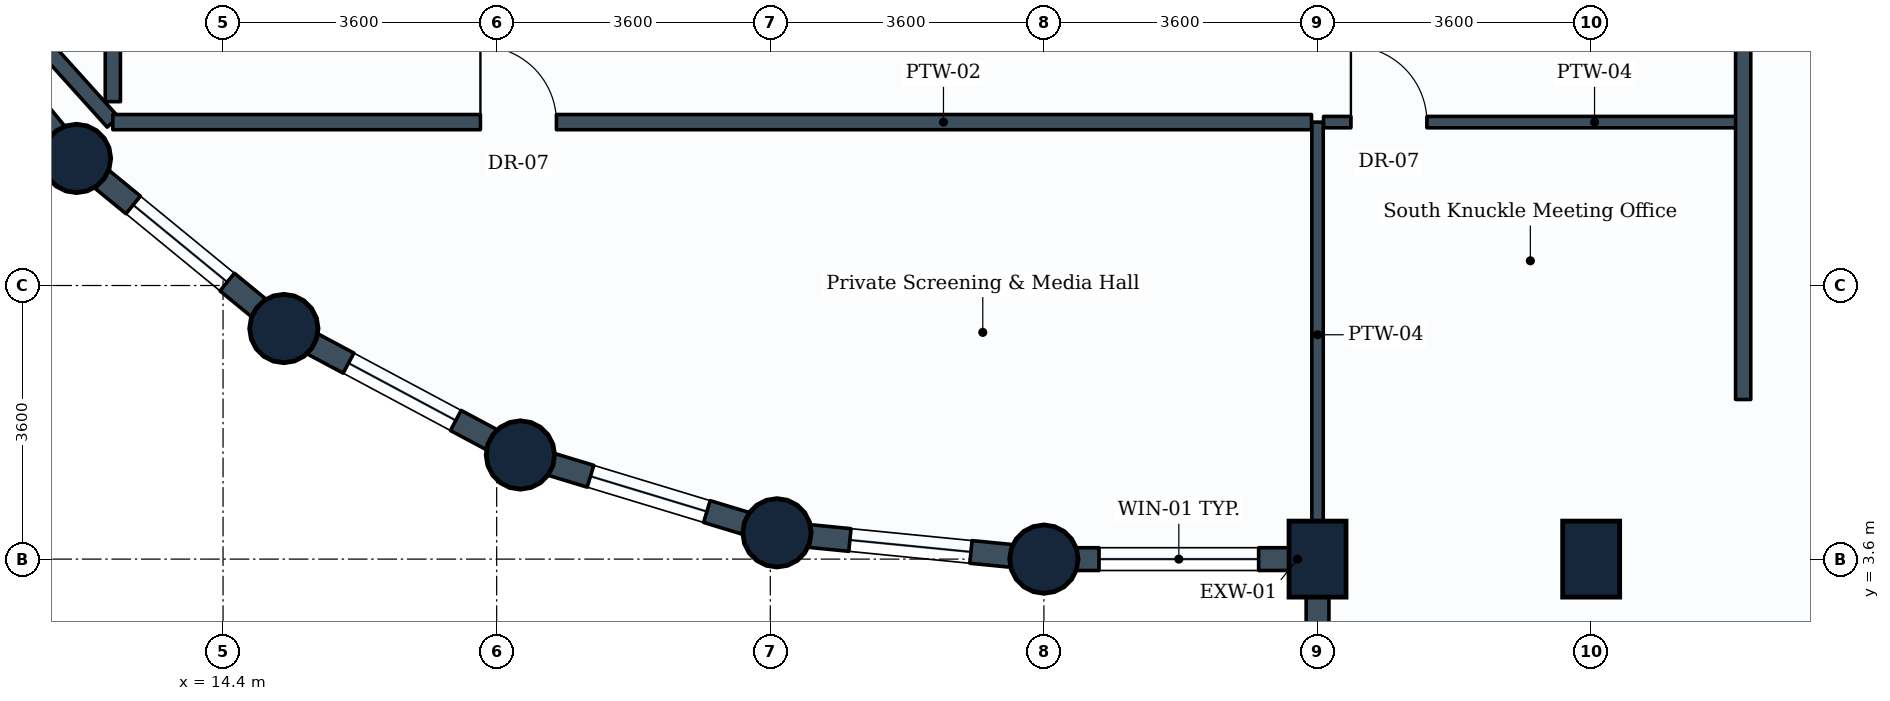
"""IFC4 building model, lengths in metres.
Left out: names, types, materials, properties, quantities, classifications, styles, units other than length and angle.
Written with IfcOpenShell. Run it as: python <this file> out.ifc"""

import sys

from ifc_helpers import new_model, si_unit, direction, frame, frame_2d, origin, origin_2d, place, context, subcontext, project, spatial, rectangle, circle, extrude, element, fill, save


model = new_model("IFC4")
c1 = context("Model", 3, precision=1e-05, world=origin(), true_north=direction((0.0, 1.0)))
c2 = subcontext(c1, "Body", "Model", "MODEL_VIEW")
j1 = project(units=[si_unit("LENGTHUNIT", "METRE"), si_unit("PLANEANGLEUNIT", "RADIAN")], contexts=[c1])
p1 = place(None, origin())
s1 = spatial("IfcSite", under=j1, at=p1, CompositionType="ELEMENT")
p2 = place(p1, origin())
s2 = spatial("IfcBuilding", under=s1, at=p2, CompositionType="ELEMENT")
p3 = place(p2, frame((0.0, 0.0, 131.4)))
s3 = spatial("IfcBuildingStorey", under=s2, at=p3, CompositionType="ELEMENT", Elevation=131.4)
for number, where, z_axis, x_axis in (
    (1, (12.472, 8.872, 0.0), (0.0, 0.0, 1.0), (1.0, 0.0, 0.0)),
    (2, (15.2, 6.634, 0.0), (0.0, 0.0, 1.0), (1.0, 0.0, 0.0)),
    (3, (18.312, 4.97, 0.0), (0.0, 0.0, 1.0), (1.0, 0.0, 0.0)),
    (4, (21.688, 3.946, 0.0), (0.0, 0.0, 1.0), (1.0, 0.0, 0.0)),
    (5, (25.2, 3.6, 0.0), (0.0, 0.0, 1.0), (1.0, 0.0, 0.0)),
):
    element("IfcColumn", number, at=place(p3, frame(where, z_axis=z_axis, x_axis=x_axis)), inside=s3, PredefinedType="COLUMN", context=c2, shape_type="SweptSolid", body=[
        extrude(circle(Radius=0.45, at=origin_2d()), origin(), (0.0, 0.0, 1.0), 3.8),
    ])
for number, where, z_axis, x_axis in (
    (6, (28.8, 3.6, 0.0), (0.0, 0.0, 1.0), (1.0, 0.0, 0.0)),
    (7, (32.4, 3.6, 0.0), (0.0, 0.0, 1.0), (1.0, 0.0, 0.0)),
):
    element("IfcColumn", number, at=place(p3, frame(where, z_axis=z_axis, x_axis=x_axis)), inside=s3, PredefinedType="COLUMN", context=c2, shape_type="SweptSolid", body=[
        extrude(rectangle(XDim=0.75, YDim=1.0, at=origin_2d()), origin(), (0.0, 0.0, 1.0), 3.8),
    ])
p4 = place(p3, frame((28.8, 3.6, 0.0), z_axis=(0.0, 0.0, 1.0), x_axis=(-1.0, 0.0, 0.0)))
e8 = element("IfcWall", 8, at=p4, inside=s3, PredefinedType="STANDARD", context=c2, shape_type="SweptSolid", body=[
    extrude(rectangle(XDim=3.6, YDim=0.3, at=frame_2d((1.8, 0.0))), origin(), (0.0, 0.0, 1.0), 2.93),
])
p5 = place(p4, frame((0.775, 0.0, 0.85)))
e9 = element("IfcOpeningElement", 9, at=p5, cuts=e8, PredefinedType="OPENING", context=c2, shape_type="SweptSolid", body=[
    extrude(rectangle(XDim=2.1, YDim=1.35, at=frame_2d((1.05, 0.675))), frame((0.0, 0.16, 0.0), z_axis=(0.0, -1.0, 0.0), x_axis=(1.0, 0.0, 0.0)), (0.0, 0.0, 1.0), 0.32),
])
p6 = place(p3, frame((28.8, 3.6, 0.0), z_axis=(0.0, 0.0, 1.0), x_axis=(0.0, -1.0, 0.0)))
e10 = element("IfcWall", 10, at=p6, inside=s3, PredefinedType="STANDARD", context=c2, shape_type="SweptSolid", body=[
    extrude(rectangle(XDim=2.1, YDim=0.3, at=frame_2d((1.05, 0.0))), origin(), (0.0, 0.0, 1.0), 2.93),
])
p7 = place(p3, frame((12.472, 8.872, 0.0), z_axis=(0.0, 0.0, 1.0), x_axis=(-0.634258295121, 0.773121216285, 0.0)))
e11 = element("IfcWall", 11, at=p7, inside=s3, PredefinedType="STANDARD", context=c2, shape_type="SweptSolid", body=[
    extrude(rectangle(XDim=3.529, YDim=0.3, at=frame_2d((1.764, 0.0))), origin(), (0.0, 0.0, 1.0), 2.93),
])
p8 = place(p7, frame((0.964, 0.0, 0.85)))
e12 = element("IfcOpeningElement", 12, at=p8, cuts=e11, PredefinedType="OPENING", context=c2, shape_type="SweptSolid", body=[
    extrude(rectangle(XDim=1.6, YDim=1.35, at=frame_2d((0.8, 0.675))), frame((0.0, 0.16, 0.0), z_axis=(0.0, -1.0, 0.0), x_axis=(1.0, 0.0, 0.0)), (0.0, 0.0, 1.0), 0.32),
])
p9 = place(p3, frame((15.2, 6.634, 0.0), z_axis=(0.0, 0.0, 1.0), x_axis=(-0.773121216285, 0.634258295121, 0.0)))
e13 = element("IfcWall", 13, at=p9, inside=s3, PredefinedType="STANDARD", context=c2, shape_type="SweptSolid", body=[
    extrude(rectangle(XDim=3.529, YDim=0.3, at=frame_2d((1.764, 0.0))), origin(), (0.0, 0.0, 1.0), 2.93),
])
p10 = place(p9, frame((0.964, 0.0, 0.85)))
e14 = element("IfcOpeningElement", 14, at=p10, cuts=e13, PredefinedType="OPENING", context=c2, shape_type="SweptSolid", body=[
    extrude(rectangle(XDim=1.6, YDim=1.35, at=frame_2d((0.8, 0.675))), frame((0.0, 0.16, 0.0), z_axis=(0.0, -1.0, 0.0), x_axis=(1.0, 0.0, 0.0)), (0.0, 0.0, 1.0), 0.32),
])
p11 = place(p3, frame((18.312, 4.97, 0.0), z_axis=(0.0, 0.0, 1.0), x_axis=(-0.881846862014, 0.471535907389, 0.0)))
e15 = element("IfcWall", 15, at=p11, inside=s3, PredefinedType="STANDARD", context=c2, shape_type="SweptSolid", body=[
    extrude(rectangle(XDim=3.529, YDim=0.3, at=frame_2d((1.765, 0.0))), origin(), (0.0, 0.0, 1.0), 2.93),
])
p12 = place(p11, frame((0.964, 0.0, 0.85)))
e16 = element("IfcOpeningElement", 16, at=p12, cuts=e15, PredefinedType="OPENING", context=c2, shape_type="SweptSolid", body=[
    extrude(rectangle(XDim=1.6, YDim=1.35, at=frame_2d((0.8, 0.675))), frame((0.0, 0.16, 0.0), z_axis=(0.0, -1.0, 0.0), x_axis=(1.0, 0.0, 0.0)), (0.0, 0.0, 1.0), 0.32),
])
p13 = place(p3, frame((21.688, 3.946, 0.0), z_axis=(0.0, 0.0, 1.0), x_axis=(-0.956953367403, 0.290241714123, 0.0)))
e17 = element("IfcWall", 17, at=p13, inside=s3, PredefinedType="STANDARD", context=c2, shape_type="SweptSolid", body=[
    extrude(rectangle(XDim=3.528, YDim=0.3, at=frame_2d((1.764, 0.0))), origin(), (0.0, 0.0, 1.0), 2.93),
])
p14 = place(p13, frame((0.964, 0.0, 0.85)))
e18 = element("IfcOpeningElement", 18, at=p14, cuts=e17, PredefinedType="OPENING", context=c2, shape_type="SweptSolid", body=[
    extrude(rectangle(XDim=1.6, YDim=1.35, at=frame_2d((0.8, 0.675))), frame((0.0, 0.16, 0.0), z_axis=(0.0, -1.0, 0.0), x_axis=(1.0, 0.0, 0.0)), (0.0, 0.0, 1.0), 0.32),
])
p15 = place(p3, frame((25.2, 3.6, 0.0), z_axis=(0.0, 0.0, 1.0), x_axis=(-0.995183369056, 0.098030923459, 0.0)))
e19 = element("IfcWall", 19, at=p15, inside=s3, PredefinedType="STANDARD", context=c2, shape_type="SweptSolid", body=[
    extrude(rectangle(XDim=3.529, YDim=0.3, at=frame_2d((1.765, 0.0))), origin(), (0.0, 0.0, 1.0), 2.93),
])
p16 = place(p15, frame((0.965, 0.0, 0.85)))
e20 = element("IfcOpeningElement", 20, at=p16, cuts=e19, PredefinedType="OPENING", context=c2, shape_type="SweptSolid", body=[
    extrude(rectangle(XDim=1.6, YDim=1.35, at=frame_2d((0.8, 0.675))), frame((0.0, 0.16, 0.0), z_axis=(0.0, -1.0, 0.0), x_axis=(1.0, 0.0, 0.0)), (0.0, 0.0, 1.0), 0.32),
])
p17 = place(p3, frame((28.8, 9.35, 0.0), z_axis=(0.0, 0.0, 1.0), x_axis=(0.0, -1.0, 0.0)))
e21 = element("IfcWall", 21, at=p17, inside=s3, PredefinedType="PARTITIONING", context=c2, shape_type="SweptSolid", body=[
    extrude(rectangle(XDim=5.596, YDim=0.15, at=frame_2d((2.798, 0.0))), origin(), (0.0, 0.0, 1.0), 3.535),
])
p18 = place(p3, frame((12.95, 9.35, 0.0), z_axis=(0.0, 0.0, 1.0), x_axis=(-0.669422074366, 0.742882282971, 0.0)))
e22 = element("IfcWall", 22, at=p18, inside=s3, PredefinedType="PARTITIONING", context=c2, shape_type="SweptSolid", body=[
    extrude(rectangle(XDim=4.6, YDim=0.2, at=frame_2d((2.3, 0.0))), origin(), (0.0, 0.0, 1.0), 2.93),
])
p19 = place(p3, frame((12.95, 9.619, 0.0), z_axis=(0.0, 0.0, 1.0), x_axis=(0.0, 1.0, 0.0)))
e23 = element("IfcWall", 23, at=p19, inside=s3, PredefinedType="PARTITIONING", context=c2, shape_type="SweptSolid", body=[
    extrude(rectangle(XDim=6.877, YDim=0.2, at=frame_2d((3.438, 0.0))), origin(), (0.0, 0.0, 1.0), 3.17),
])
p20 = place(p19, frame((3.962, 0.0, 0.0)))
e24 = element("IfcOpeningElement", 24, at=p20, cuts=e23, PredefinedType="OPENING", context=c2, shape_type="SweptSolid", body=[
    extrude(rectangle(XDim=1.0, YDim=2.1, at=frame_2d((0.5, 1.05))), frame((0.0, 0.11, 0.0), z_axis=(0.0, -1.0, 0.0), x_axis=(1.0, 0.0, 0.0)), (0.0, 0.0, 1.0), 0.22),
])
p21 = place(p3, frame((12.95, 9.35, 0.0), z_axis=(0.0, 0.0, 1.0), x_axis=(1.0, 0.0, 0.0)))
e25 = element("IfcWall", 25, at=p21, inside=s3, PredefinedType="PARTITIONING", context=c2, shape_type="SweptSolid", body=[
    extrude(rectangle(XDim=15.771, YDim=0.2, at=frame_2d((7.885, 0.0))), origin(), (0.0, 0.0, 1.0), 3.17),
])
p22 = place(p21, frame((4.836, 0.0, 0.0)))
e26 = element("IfcOpeningElement", 26, at=p22, cuts=e25, PredefinedType="OPENING", context=c2, shape_type="SweptSolid", body=[
    extrude(rectangle(XDim=1.0, YDim=2.1, at=frame_2d((0.5, 1.05))), frame((0.0, 0.11, 0.0), z_axis=(0.0, -1.0, 0.0), x_axis=(1.0, 0.0, 0.0)), (0.0, 0.0, 1.0), 0.22),
])
p23 = place(p3, frame((28.879, 9.35, 0.0), z_axis=(0.0, 0.0, 1.0), x_axis=(1.0, 0.0, 0.0)))
e27 = element("IfcWall", 27, at=p23, inside=s3, PredefinedType="PARTITIONING", context=c2, shape_type="SweptSolid", body=[
    extrude(rectangle(XDim=5.521, YDim=0.15, at=frame_2d((2.76, 0.0))), origin(), (0.0, 0.0, 1.0), 3.535),
])
p24 = place(p23, frame((0.36, 0.0, 0.0)))
e28 = element("IfcOpeningElement", 28, at=p24, cuts=e27, PredefinedType="OPENING", context=c2, shape_type="SweptSolid", body=[
    extrude(rectangle(XDim=1.0, YDim=2.1, at=frame_2d((0.5, 1.05))), frame((0.0, 0.085, 0.0), z_axis=(0.0, -1.0, 0.0), x_axis=(1.0, 0.0, 0.0)), (0.0, 0.0, 1.0), 0.17),
])
p25 = place(p3, frame((34.4, 5.7, 0.0), z_axis=(0.0, 0.0, 1.0), x_axis=(0.0, 1.0, 0.0)))
e29 = element("IfcWall", 29, at=p25, inside=s3, PredefinedType="PARTITIONING", context=c2, shape_type="SweptSolid", body=[
    extrude(rectangle(XDim=10.6, YDim=0.2, at=frame_2d((5.3, 0.0))), origin(), (0.0, 0.0, 1.0), 3.17),
])
p26 = place(p5, origin())
e30 = element("IfcWindow", 30, at=p26, inside=s3, PartitioningType="SINGLE_PANEL", PredefinedType="WINDOW", context=c2, shape_type="SweptSolid", body=[
    extrude(rectangle(XDim=2.1, YDim=1.35, at=frame_2d((1.05, 0.675))), frame((0.0, 0.03, 0.0), z_axis=(0.0, -1.0, 0.0), x_axis=(1.0, 0.0, 0.0)), (0.0, 0.0, 1.0), 0.06),
])
fill(e9, e30)
p27 = place(p10, origin())
e31 = element("IfcWindow", 31, at=p27, inside=s3, PartitioningType="SINGLE_PANEL", PredefinedType="WINDOW", context=c2, shape_type="SweptSolid", body=[
    extrude(rectangle(XDim=1.6, YDim=1.35, at=frame_2d((0.8, 0.675))), frame((0.0, 0.03, 0.0), z_axis=(0.0, -1.0, 0.0), x_axis=(1.0, 0.0, 0.0)), (0.0, 0.0, 1.0), 0.06),
])
fill(e14, e31)
p28 = place(p12, origin())
e32 = element("IfcWindow", 32, at=p28, inside=s3, PartitioningType="SINGLE_PANEL", PredefinedType="WINDOW", context=c2, shape_type="SweptSolid", body=[
    extrude(rectangle(XDim=1.6, YDim=1.35, at=frame_2d((0.8, 0.675))), frame((0.0, 0.03, 0.0), z_axis=(0.0, -1.0, 0.0), x_axis=(1.0, 0.0, 0.0)), (0.0, 0.0, 1.0), 0.06),
])
fill(e16, e32)
p29 = place(p14, origin())
e33 = element("IfcWindow", 33, at=p29, inside=s3, PartitioningType="SINGLE_PANEL", PredefinedType="WINDOW", context=c2, shape_type="SweptSolid", body=[
    extrude(rectangle(XDim=1.6, YDim=1.35, at=frame_2d((0.8, 0.675))), frame((0.0, 0.03, 0.0), z_axis=(0.0, -1.0, 0.0), x_axis=(1.0, 0.0, 0.0)), (0.0, 0.0, 1.0), 0.06),
])
fill(e18, e33)
p30 = place(p16, origin())
e34 = element("IfcWindow", 34, at=p30, inside=s3, PartitioningType="SINGLE_PANEL", PredefinedType="WINDOW", context=c2, shape_type="SweptSolid", body=[
    extrude(rectangle(XDim=1.6, YDim=1.35, at=frame_2d((0.8, 0.675))), frame((0.0, 0.03, 0.0), z_axis=(0.0, -1.0, 0.0), x_axis=(1.0, 0.0, 0.0)), (0.0, 0.0, 1.0), 0.06),
])
fill(e20, e34)
p31 = place(p22, origin())
e35 = element("IfcDoor", 35, at=p31, inside=s3, OperationType="SINGLE_SWING_LEFT", PredefinedType="DOOR", context=c2, shape_type="SweptSolid", body=[
    extrude(rectangle(XDim=1.0, YDim=2.1, at=frame_2d((0.5, 1.05))), frame((0.0, 0.025, 0.0), z_axis=(0.0, -1.0, 0.0), x_axis=(1.0, 0.0, 0.0)), (0.0, 0.0, 1.0), 0.05),
])
fill(e26, e35)
p32 = place(p24, origin())
e36 = element("IfcDoor", 36, at=p32, inside=s3, OperationType="SINGLE_SWING_LEFT", PredefinedType="DOOR", context=c2, shape_type="SweptSolid", body=[
    extrude(rectangle(XDim=1.0, YDim=2.1, at=frame_2d((0.5, 1.05))), frame((0.0, 0.025, 0.0), z_axis=(0.0, -1.0, 0.0), x_axis=(1.0, 0.0, 0.0)), (0.0, 0.0, 1.0), 0.05),
])
fill(e28, e36)
save(model, sys.argv[1])
